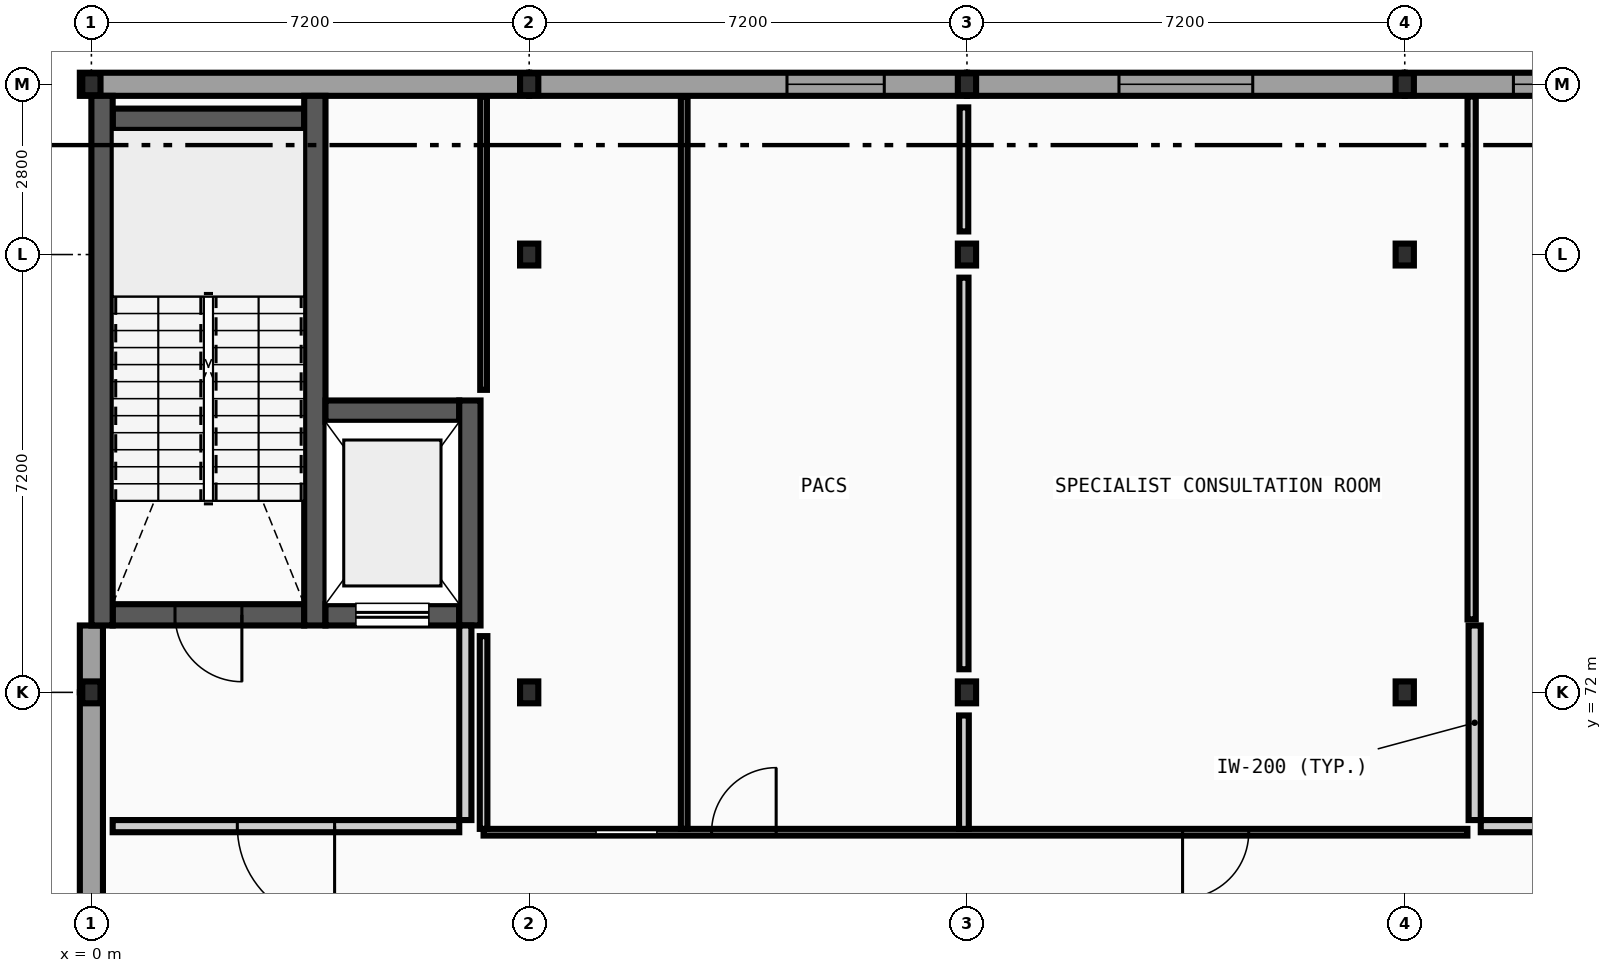
"""IFC4 building model, lengths in metres.
Left out: names, types, materials, properties, quantities, classifications, styles, units other than length and angle.
Written with IfcOpenShell. Run it as: python <this file> out.ifc"""

import sys

from ifc_helpers import new_model, si_unit, direction, frame, frame_2d, origin, origin_2d, place, context, subcontext, project, spatial, rectangle, i_section, extrude, element, fill, save


model = new_model("IFC4")
c1 = context("Model", 3, precision=1e-05, world=origin(), true_north=direction((0.0, 1.0)))
c2 = subcontext(c1, "Body", "Model", "MODEL_VIEW")
j1 = project(units=[si_unit("LENGTHUNIT", "METRE"), si_unit("PLANEANGLEUNIT", "RADIAN")], contexts=[c1])
p1 = place(None, origin())
s1 = spatial("IfcSite", under=j1, at=p1, CompositionType="ELEMENT")
p2 = place(p1, origin())
s2 = spatial("IfcBuilding", under=s1, at=p2, CompositionType="ELEMENT")
p3 = place(p2, frame((0.0, 0.0, 5.2)))
s3 = spatial("IfcBuildingStorey", under=s2, at=p3, CompositionType="ELEMENT", Elevation=5.2)
for number, where, z_axis, x_axis in (
    (1, (0.0, 72.0, 0.0), (0.0, 0.0, 1.0), (1.0, 0.0, 0.0)),
    (2, (0.0, 82.0, 0.0), (0.0, 0.0, 1.0), (1.0, 0.0, 0.0)),
    (3, (7.2, 72.0, 0.0), (0.0, 0.0, 1.0), (1.0, 0.0, 0.0)),
    (4, (7.2, 79.2, 0.0), (0.0, 0.0, 1.0), (1.0, 0.0, 0.0)),
    (5, (7.2, 82.0, 0.0), (0.0, 0.0, 1.0), (1.0, 0.0, 0.0)),
    (6, (14.4, 72.0, 0.0), (0.0, 0.0, 1.0), (1.0, 0.0, 0.0)),
    (7, (14.4, 79.2, 0.0), (0.0, 0.0, 1.0), (1.0, 0.0, 0.0)),
    (8, (14.4, 82.0, 0.0), (0.0, 0.0, 1.0), (1.0, 0.0, 0.0)),
    (9, (21.6, 72.0, 0.0), (0.0, 0.0, 1.0), (1.0, 0.0, 0.0)),
    (10, (21.6, 79.2, 0.0), (0.0, 0.0, 1.0), (1.0, 0.0, 0.0)),
    (11, (21.6, 82.0, 0.0), (0.0, 0.0, 1.0), (1.0, 0.0, 0.0)),
):
    element("IfcColumn", number, at=place(p3, frame(where, z_axis=z_axis, x_axis=x_axis)), inside=s3, PredefinedType="COLUMN", context=c2, shape_type="SweptSolid", body=[
        extrude(i_section(OverallWidth=0.3, OverallDepth=0.36, WebThickness=0.012, FlangeThickness=0.022, FilletRadius=0.027, at=origin_2d()), origin(), (0.0, 0.0, 1.0), 4.4),
    ])
p4 = place(p3, frame((7.2, 82.0, 0.0), z_axis=(0.0, 0.0, 1.0), x_axis=(-1.0, 0.0, 0.0)))
e12 = element("IfcWall", 12, at=p4, inside=s3, PredefinedType="STANDARD", context=c2, shape_type="SweptSolid", body=[
    extrude(rectangle(XDim=7.39, YDim=0.38, at=frame_2d((3.695, 0.0))), origin(), (0.0, 0.0, 1.0), 3.88),
])
p5 = place(p3, frame((14.4, 82.0, 0.0), z_axis=(0.0, 0.0, 1.0), x_axis=(-1.0, 0.0, 0.0)))
e13 = element("IfcWall", 13, at=p5, inside=s3, PredefinedType="STANDARD", context=c2, shape_type="SweptSolid", body=[
    extrude(rectangle(XDim=7.2, YDim=0.38, at=frame_2d((3.6, 0.0))), origin(), (0.0, 0.0, 1.0), 3.88),
])
p6 = place(p5, frame((1.36, 0.0, 1.2)))
e14 = element("IfcOpeningElement", 14, at=p6, cuts=e13, PredefinedType="OPENING", context=c2, shape_type="SweptSolid", body=[
    extrude(rectangle(XDim=1.6, YDim=1.4, at=frame_2d((0.8, 0.7))), frame((0.0, 0.2, 0.0), z_axis=(0.0, -1.0, 0.0), x_axis=(1.0, 0.0, 0.0)), (0.0, 0.0, 1.0), 0.4),
])
p7 = place(p3, frame((21.6, 82.0, 0.0), z_axis=(0.0, 0.0, 1.0), x_axis=(-1.0, 0.0, 0.0)))
e15 = element("IfcWall", 15, at=p7, inside=s3, PredefinedType="STANDARD", context=c2, shape_type="SweptSolid", body=[
    extrude(rectangle(XDim=7.2, YDim=0.38, at=frame_2d((3.6, 0.0))), origin(), (0.0, 0.0, 1.0), 3.88),
])
p8 = place(p7, frame((2.5, 0.0, 0.95)))
e16 = element("IfcOpeningElement", 16, at=p8, cuts=e15, PredefinedType="OPENING", context=c2, shape_type="SweptSolid", body=[
    extrude(rectangle(XDim=2.2, YDim=1.75, at=frame_2d((1.1, 0.875))), frame((0.0, 0.2, 0.0), z_axis=(0.0, -1.0, 0.0), x_axis=(1.0, 0.0, 0.0)), (0.0, 0.0, 1.0), 0.4),
])
p9 = place(p3, frame((28.99, 82.0, 0.0), z_axis=(0.0, 0.0, 1.0), x_axis=(-1.0, 0.0, 0.0)))
e17 = element("IfcWall", 17, at=p9, inside=s3, PredefinedType="STANDARD", context=c2, shape_type="SweptSolid", body=[
    extrude(rectangle(XDim=7.39, YDim=0.38, at=frame_2d((3.695, 0.0))), origin(), (0.0, 0.0, 1.0), 3.88),
])
p10 = place(p9, frame((1.787, 0.0, 0.95)))
e18 = element("IfcOpeningElement", 18, at=p10, cuts=e17, PredefinedType="OPENING", context=c2, shape_type="SweptSolid", body=[
    extrude(rectangle(XDim=0.86, YDim=1.26, at=frame_2d((0.43, 0.63))), frame((0.0, 0.2, 0.0), z_axis=(0.0, -1.0, 0.0), x_axis=(1.0, 0.0, 0.0)), (0.0, 0.0, 1.0), 0.4),
])
p11 = place(p9, frame((4.743, 0.0, 0.95)))
e19 = element("IfcOpeningElement", 19, at=p11, cuts=e17, PredefinedType="OPENING", context=c2, shape_type="SweptSolid", body=[
    extrude(rectangle(XDim=0.86, YDim=1.26, at=frame_2d((0.43, 0.63))), frame((0.0, 0.2, 0.0), z_axis=(0.0, -1.0, 0.0), x_axis=(1.0, 0.0, 0.0)), (0.0, 0.0, 1.0), 0.4),
])
p12 = place(p3, frame((0.0, 72.0, 0.0), z_axis=(0.0, 0.0, 1.0), x_axis=(0.0, -1.0, 0.0)))
e20 = element("IfcWall", 20, at=p12, inside=s3, PredefinedType="STANDARD", context=c2, shape_type="SweptSolid", body=[
    extrude(rectangle(XDim=7.2, YDim=0.38, at=frame_2d((3.6, 0.0))), origin(), (0.0, 0.0, 1.0), 3.81),
])
p13 = place(p3, frame((0.0, 73.1, 0.0), z_axis=(0.0, 0.0, 1.0), x_axis=(0.0, -1.0, 0.0)))
e21 = element("IfcWall", 21, at=p13, inside=s3, PredefinedType="STANDARD", context=c2, shape_type="SweptSolid", body=[
    extrude(rectangle(XDim=1.1, YDim=0.38, at=frame_2d((0.55, 0.0))), origin(), (0.0, 0.0, 1.0), 4.185),
])
p14 = place(p3, frame((0.35, 73.275, 0.0), z_axis=(0.0, 0.0, 1.0), x_axis=(1.0, 0.0, 0.0)))
e22 = element("IfcWall", 22, at=p14, inside=s3, PredefinedType="SHEAR", context=c2, shape_type="SweptSolid", body=[
    extrude(rectangle(XDim=3.15, YDim=0.35, at=frame_2d((1.575, 0.0))), origin(), (0.0, 0.0, 1.0), 4.185),
])
p15 = place(p14, frame((1.025, 0.0, 0.0)))
e23 = element("IfcOpeningElement", 23, at=p15, cuts=e22, PredefinedType="OPENING", context=c2, shape_type="SweptSolid", body=[
    extrude(rectangle(XDim=1.1, YDim=2.15, at=frame_2d((0.55, 1.075))), frame((0.0, 0.185, 0.0), z_axis=(0.0, -1.0, 0.0), x_axis=(1.0, 0.0, 0.0)), (0.0, 0.0, 1.0), 0.37),
])
p16 = place(p3, frame((0.35, 81.425, 0.0), z_axis=(0.0, 0.0, 1.0), x_axis=(1.0, 0.0, 0.0)))
e24 = element("IfcWall", 24, at=p16, inside=s3, PredefinedType="SHEAR", context=c2, shape_type="SweptSolid", body=[
    extrude(rectangle(XDim=3.15, YDim=0.35, at=frame_2d((1.575, 0.0))), origin(), (0.0, 0.0, 1.0), 4.185),
])
for number, where, z_axis, x_axis in (
    (25, (0.175, 73.1, 0.0), (0.0, 0.0, 1.0), (0.0, 1.0, 0.0)),
    (26, (3.675, 73.1, 0.0), (0.0, 0.0, 1.0), (0.0, 1.0, 0.0)),
):
    element("IfcWall", number, at=place(p3, frame(where, z_axis=z_axis, x_axis=x_axis)), inside=s3, PredefinedType="SHEAR", context=c2, shape_type="SweptSolid", body=[
        extrude(rectangle(XDim=8.71, YDim=0.35, at=frame_2d((4.355, 0.0))), origin(), (0.0, 0.0, 1.0), 4.185),
    ])
p17 = place(p3, frame((3.85, 73.275, 0.0), z_axis=(0.0, 0.0, 1.0), x_axis=(1.0, 0.0, 0.0)))
e27 = element("IfcWall", 27, at=p17, inside=s3, PredefinedType="SHEAR", context=c2, shape_type="SweptSolid", body=[
    extrude(rectangle(XDim=2.2, YDim=0.35, at=frame_2d((1.1, 0.0))), origin(), (0.0, 0.0, 1.0), 4.185),
])
p18 = place(p17, frame((0.5, 0.0, 0.0)))
e28 = element("IfcOpeningElement", 28, at=p18, cuts=e27, PredefinedType="OPENING", context=c2, shape_type="SweptSolid", body=[
    extrude(rectangle(XDim=1.2, YDim=2.2, at=frame_2d((0.6, 1.1))), frame((0.0, 0.185, 0.0), z_axis=(0.0, -1.0, 0.0), x_axis=(1.0, 0.0, 0.0)), (0.0, 0.0, 1.0), 0.37),
])
p19 = place(p3, frame((3.85, 76.625, 0.0), z_axis=(0.0, 0.0, 1.0), x_axis=(1.0, 0.0, 0.0)))
e29 = element("IfcWall", 29, at=p19, inside=s3, PredefinedType="SHEAR", context=c2, shape_type="SweptSolid", body=[
    extrude(rectangle(XDim=2.2, YDim=0.35, at=frame_2d((1.1, 0.0))), origin(), (0.0, 0.0, 1.0), 4.185),
])
p20 = place(p3, frame((6.225, 73.1, 0.0), z_axis=(0.0, 0.0, 1.0), x_axis=(0.0, 1.0, 0.0)))
e30 = element("IfcWall", 30, at=p20, inside=s3, PredefinedType="SHEAR", context=c2, shape_type="SweptSolid", body=[
    extrude(rectangle(XDim=3.7, YDim=0.35, at=frame_2d((1.85, 0.0))), origin(), (0.0, 0.0, 1.0), 4.185),
])
p21 = place(p3, frame((0.35, 69.8, 0.0), z_axis=(0.0, 0.0, 1.0), x_axis=(1.0, 0.0, 0.0)))
e31 = element("IfcWall", 31, at=p21, inside=s3, PredefinedType="PARTITIONING", context=c2, shape_type="SweptSolid", body=[
    extrude(rectangle(XDim=5.7, YDim=0.2, at=frame_2d((2.85, 0.0))), origin(), (0.0, 0.0, 1.0), 4.185),
])
p22 = place(p21, frame((2.05, 0.0, 0.0)))
e32 = element("IfcOpeningElement", 32, at=p22, cuts=e31, PredefinedType="OPENING", context=c2, shape_type="SweptSolid", body=[
    extrude(rectangle(XDim=1.6, YDim=2.2, at=frame_2d((0.8, 1.1))), frame((0.0, 0.11, 0.0), z_axis=(0.0, -1.0, 0.0), x_axis=(1.0, 0.0, 0.0)), (0.0, 0.0, 1.0), 0.22),
])
p23 = place(p3, frame((6.15, 69.9, 0.0), z_axis=(0.0, 0.0, 1.0), x_axis=(0.0, 1.0, 0.0)))
e33 = element("IfcWall", 33, at=p23, inside=s3, PredefinedType="PARTITIONING", context=c2, shape_type="SweptSolid", body=[
    extrude(rectangle(XDim=3.2, YDim=0.2, at=frame_2d((1.6, 0.0))), origin(), (0.0, 0.0, 1.0), 4.185),
])
p24 = place(p3, frame((22.85, 69.8, 0.0), z_axis=(0.0, 0.0, 1.0), x_axis=(1.0, 0.0, 0.0)))
e34 = element("IfcWall", 34, at=p24, inside=s3, PredefinedType="PARTITIONING", context=c2, shape_type="SweptSolid", body=[
    extrude(rectangle(XDim=5.6, YDim=0.2, at=frame_2d((2.8, 0.0))), origin(), (0.0, 0.0, 1.0), 4.185),
])
p25 = place(p24, frame((2.0, 0.0, 0.0)))
e35 = element("IfcOpeningElement", 35, at=p25, cuts=e34, PredefinedType="OPENING", context=c2, shape_type="SweptSolid", body=[
    extrude(rectangle(XDim=1.6, YDim=2.2, at=frame_2d((0.8, 1.1))), frame((0.0, 0.11, 0.0), z_axis=(0.0, -1.0, 0.0), x_axis=(1.0, 0.0, 0.0)), (0.0, 0.0, 1.0), 0.22),
])
p26 = place(p3, frame((22.75, 69.9, 0.0), z_axis=(0.0, 0.0, 1.0), x_axis=(0.0, 1.0, 0.0)))
e36 = element("IfcWall", 36, at=p26, inside=s3, PredefinedType="PARTITIONING", context=c2, shape_type="SweptSolid", body=[
    extrude(rectangle(XDim=3.2, YDim=0.2, at=frame_2d((1.6, 0.0))), origin(), (0.0, 0.0, 1.0), 4.185),
])
p27 = place(p3, frame((6.45, 69.7, 0.0), z_axis=(0.0, 0.0, 1.0), x_axis=(1.0, 0.0, 0.0)))
e37 = element("IfcWall", 37, at=p27, inside=s3, PredefinedType="PARTITIONING", context=c2, shape_type="SweptSolid", body=[
    extrude(rectangle(XDim=16.18, YDim=0.11, at=frame_2d((8.09, 0.0))), origin(), (0.0, 0.0, 1.0), 4.185),
])
p28 = place(p27, frame((1.85, 0.0, 0.0)))
e38 = element("IfcOpeningElement", 38, at=p28, cuts=e37, PredefinedType="OPENING", context=c2, shape_type="SweptSolid", body=[
    extrude(rectangle(XDim=1.0, YDim=2.1, at=frame_2d((0.5, 1.05))), frame((0.0, 0.065, 0.0), z_axis=(0.0, -1.0, 0.0), x_axis=(1.0, 0.0, 0.0)), (0.0, 0.0, 1.0), 0.13),
])
p29 = place(p27, frame((3.75, 0.0, 0.0)))
e39 = element("IfcOpeningElement", 39, at=p29, cuts=e37, PredefinedType="OPENING", context=c2, shape_type="SweptSolid", body=[
    extrude(rectangle(XDim=1.062, YDim=2.124, at=frame_2d((0.531, 1.062))), frame((0.0, 0.065, 0.0), z_axis=(0.0, -1.0, 0.0), x_axis=(1.0, 0.0, 0.0)), (0.0, 0.0, 1.0), 0.13),
])
p30 = place(p27, frame((11.496, 0.0, 0.0)))
e40 = element("IfcOpeningElement", 40, at=p30, cuts=e37, PredefinedType="OPENING", context=c2, shape_type="SweptSolid", body=[
    extrude(rectangle(XDim=1.088, YDim=2.124, at=frame_2d((0.544, 1.062))), frame((0.0, 0.065, 0.0), z_axis=(0.0, -1.0, 0.0), x_axis=(1.0, 0.0, 0.0)), (0.0, 0.0, 1.0), 0.13),
])
p31 = place(p3, frame((6.45, 69.755, 0.0), z_axis=(0.0, 0.0, 1.0), x_axis=(0.0, 1.0, 0.0)))
e41 = element("IfcWall", 41, at=p31, inside=s3, PredefinedType="PARTITIONING", context=c2, shape_type="SweptSolid", body=[
    extrude(rectangle(XDim=3.17, YDim=0.125, at=frame_2d((1.585, 0.0))), origin(), (0.0, 0.0, 1.0), 4.185),
])
p32 = place(p3, frame((6.45, 76.975, 0.0), z_axis=(0.0, 0.0, 1.0), x_axis=(0.0, 1.0, 0.0)))
e42 = element("IfcWall", 42, at=p32, inside=s3, PredefinedType="PARTITIONING", context=c2, shape_type="SweptSolid", body=[
    extrude(rectangle(XDim=4.825, YDim=0.11, at=frame_2d((2.413, 0.0))), origin(), (0.0, 0.0, 1.0), 4.185),
])
p33 = place(p3, frame((9.75, 69.755, 0.0), z_axis=(0.0, 0.0, 1.0), x_axis=(0.0, 1.0, 0.0)))
e43 = element("IfcWall", 43, at=p33, inside=s3, PredefinedType="PARTITIONING", context=c2, shape_type="SweptSolid", body=[
    extrude(rectangle(XDim=12.045, YDim=0.11, at=frame_2d((6.022, 0.0))), origin(), (0.0, 0.0, 1.0), 3.9),
])
p34 = place(p3, frame((14.35, 69.755, 0.0), z_axis=(0.0, 0.0, 1.0), x_axis=(0.0, 1.0, 0.0)))
e44 = element("IfcWall", 44, at=p34, inside=s3, PredefinedType="PARTITIONING", context=c2, shape_type="SweptSolid", body=[
    extrude(rectangle(XDim=1.865, YDim=0.16, at=frame_2d((0.933, 0.0))), origin(), (0.0, 0.0, 1.0), 3.88),
])
p35 = place(p3, frame((14.35, 72.38, 0.0), z_axis=(0.0, 0.0, 1.0), x_axis=(0.0, 1.0, 0.0)))
e45 = element("IfcWall", 45, at=p35, inside=s3, PredefinedType="PARTITIONING", context=c2, shape_type="SweptSolid", body=[
    extrude(rectangle(XDim=6.44, YDim=0.15, at=frame_2d((3.22, 0.0))), origin(), (0.0, 0.0, 1.0), 3.88),
])
p36 = place(p3, frame((14.35, 79.58, 0.0), z_axis=(0.0, 0.0, 1.0), x_axis=(0.0, 1.0, 0.0)))
e46 = element("IfcWall", 46, at=p36, inside=s3, PredefinedType="PARTITIONING", context=c2, shape_type="SweptSolid", body=[
    extrude(rectangle(XDim=2.04, YDim=0.142, at=frame_2d((1.02, 0.0))), origin(), (0.0, 0.0, 1.0), 3.88),
])
p37 = place(p3, frame((22.7, 73.2, 0.0), z_axis=(0.0, 0.0, 1.0), x_axis=(0.0, 1.0, 0.0)))
e47 = element("IfcWall", 47, at=p37, inside=s3, PredefinedType="PARTITIONING", context=c2, shape_type="SweptSolid", body=[
    extrude(rectangle(XDim=8.6, YDim=0.135, at=frame_2d((4.3, 0.0))), origin(), (0.0, 0.0, 1.0), 4.185),
])
p38 = place(p6, origin())
e48 = element("IfcWindow", 48, at=p38, inside=s3, PartitioningType="SINGLE_PANEL", PredefinedType="WINDOW", context=c2, shape_type="SweptSolid", body=[
    extrude(rectangle(XDim=1.6, YDim=1.4, at=frame_2d((0.8, 0.7))), frame((0.0, 0.03, 0.0), z_axis=(0.0, -1.0, 0.0), x_axis=(1.0, 0.0, 0.0)), (0.0, 0.0, 1.0), 0.06),
])
fill(e14, e48)
p39 = place(p8, origin())
e49 = element("IfcWindow", 49, at=p39, inside=s3, PartitioningType="SINGLE_PANEL", PredefinedType="WINDOW", context=c2, shape_type="SweptSolid", body=[
    extrude(rectangle(XDim=2.2, YDim=1.75, at=frame_2d((1.1, 0.875))), frame((0.0, 0.03, 0.0), z_axis=(0.0, -1.0, 0.0), x_axis=(1.0, 0.0, 0.0)), (0.0, 0.0, 1.0), 0.06),
])
fill(e16, e49)
p40 = place(p11, origin())
e50 = element("IfcWindow", 50, at=p40, inside=s3, PartitioningType="SINGLE_PANEL", PredefinedType="WINDOW", context=c2, shape_type="SweptSolid", body=[
    extrude(rectangle(XDim=0.86, YDim=1.26, at=frame_2d((0.43, 0.63))), frame((0.0, 0.03, 0.0), z_axis=(0.0, -1.0, 0.0), x_axis=(1.0, 0.0, 0.0)), (0.0, 0.0, 1.0), 0.06),
])
fill(e19, e50)
p41 = place(p15, origin())
e51 = element("IfcDoor", 51, at=p41, inside=s3, OperationType="SINGLE_SWING_RIGHT", PredefinedType="DOOR", context=c2, shape_type="SweptSolid", body=[
    extrude(rectangle(XDim=1.1, YDim=2.15, at=frame_2d((0.55, 1.075))), frame((0.0, 0.025, 0.0), z_axis=(0.0, -1.0, 0.0), x_axis=(1.0, 0.0, 0.0)), (0.0, 0.0, 1.0), 0.05),
])
fill(e23, e51)
p42 = place(p18, origin())
e52 = element("IfcDoor", 52, at=p42, inside=s3, OperationType="SLIDING_TO_RIGHT", PredefinedType="DOOR", context=c2, shape_type="SweptSolid", body=[
    extrude(rectangle(XDim=1.2, YDim=2.2, at=frame_2d((0.6, 1.1))), frame((0.0, 0.025, 0.0), z_axis=(0.0, -1.0, 0.0), x_axis=(1.0, 0.0, 0.0)), (0.0, 0.0, 1.0), 0.05),
])
fill(e28, e52)
p43 = place(p22, origin())
e53 = element("IfcDoor", 53, at=p43, inside=s3, OperationType="DOUBLE_DOOR_SINGLE_SWING", PredefinedType="DOOR", context=c2, shape_type="SweptSolid", body=[
    extrude(rectangle(XDim=1.6, YDim=2.2, at=frame_2d((0.8, 1.1))), frame((0.0, 0.025, 0.0), z_axis=(0.0, -1.0, 0.0), x_axis=(1.0, 0.0, 0.0)), (0.0, 0.0, 1.0), 0.05),
])
fill(e32, e53)
p44 = place(p28, frame((1.0, 0.0, 0.0), z_axis=(0.0, 0.0, 1.0), x_axis=(-1.0, 0.0, 0.0)))
e54 = element("IfcDoor", 54, at=p44, inside=s3, OperationType="SLIDING_TO_LEFT", PredefinedType="DOOR", context=c2, shape_type="SweptSolid", body=[
    extrude(rectangle(XDim=1.0, YDim=2.1, at=frame_2d((0.5, 1.05))), frame((0.0, 0.025, 0.0), z_axis=(0.0, -1.0, 0.0), x_axis=(1.0, 0.0, 0.0)), (0.0, 0.0, 1.0), 0.05),
])
fill(e38, e54)
p45 = place(p29, frame((1.062, 0.0, 0.0), z_axis=(0.0, 0.0, 1.0), x_axis=(-1.0, 0.0, 0.0)))
e55 = element("IfcDoor", 55, at=p45, inside=s3, OperationType="SINGLE_SWING_RIGHT", PredefinedType="DOOR", context=c2, shape_type="SweptSolid", body=[
    extrude(rectangle(XDim=1.062, YDim=2.124, at=frame_2d((0.531, 1.062))), frame((0.0, 0.025, 0.0), z_axis=(0.0, -1.0, 0.0), x_axis=(1.0, 0.0, 0.0)), (0.0, 0.0, 1.0), 0.05),
])
fill(e39, e55)
p46 = place(p30, frame((1.088, 0.0, 0.0), z_axis=(0.0, 0.0, 1.0), x_axis=(-1.0, 0.0, 0.0)))
e56 = element("IfcDoor", 56, at=p46, inside=s3, OperationType="SINGLE_SWING_LEFT", PredefinedType="DOOR", context=c2, shape_type="SweptSolid", body=[
    extrude(rectangle(XDim=1.088, YDim=2.124, at=frame_2d((0.544, 1.062))), frame((0.0, 0.025, 0.0), z_axis=(0.0, -1.0, 0.0), x_axis=(1.0, 0.0, 0.0)), (0.0, 0.0, 1.0), 0.05),
])
fill(e40, e56)
save(model, sys.argv[1])
